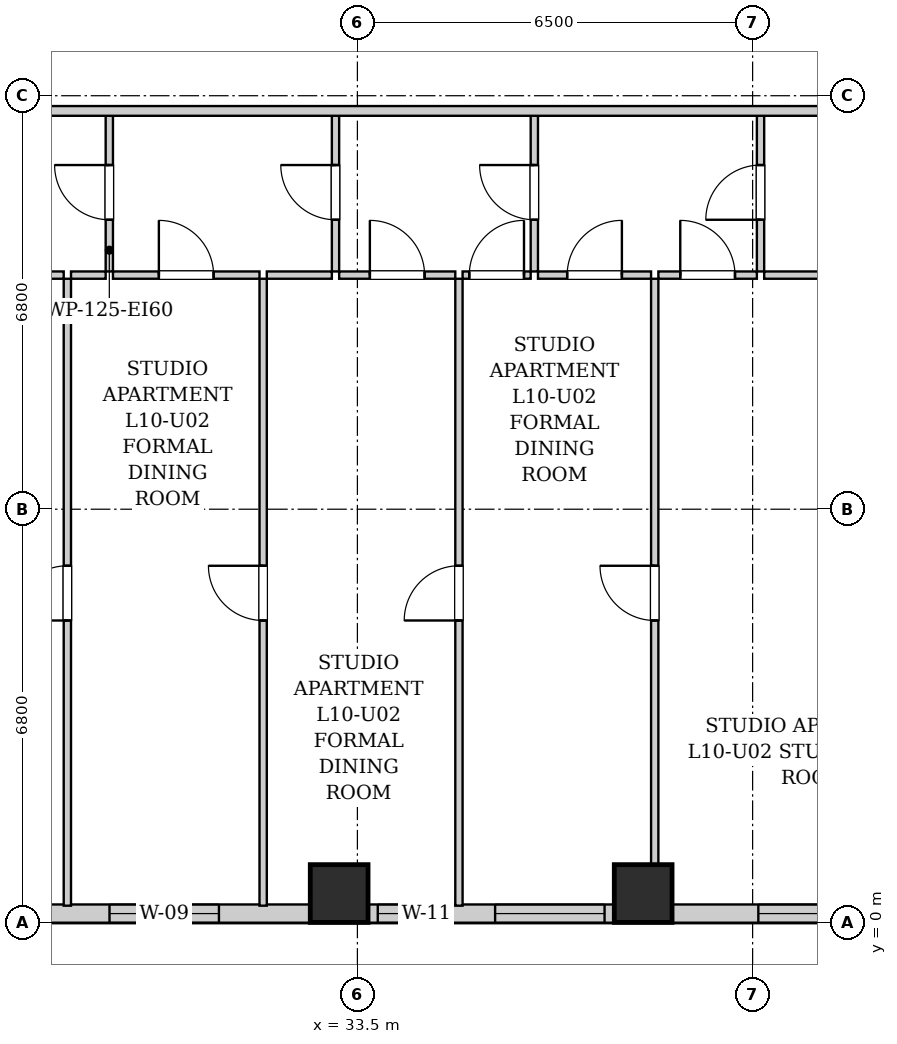
"""IFC4 building model, lengths in metres.
Left out: names, types, materials, properties, quantities, classifications, styles, units other than length and angle.
Written with IfcOpenShell. Run it as: python <this file> out.ifc"""

import sys

from ifc_helpers import new_model, si_unit, direction, frame, frame_2d, origin, origin_2d, place, context, subcontext, project, spatial, rectangle, extrude, element, fill, save


model = new_model("IFC4")
c1 = context("Model", 3, precision=1e-05, world=origin(), true_north=direction((0.0, 1.0)))
c2 = subcontext(c1, "Body", "Model", "MODEL_VIEW")
j1 = project(units=[si_unit("LENGTHUNIT", "METRE"), si_unit("PLANEANGLEUNIT", "RADIAN")], contexts=[c1])
p1 = place(None, origin())
s1 = spatial("IfcSite", under=j1, at=p1, CompositionType="ELEMENT")
p2 = place(p1, origin())
s2 = spatial("IfcBuilding", under=s1, at=p2, CompositionType="ELEMENT")
p3 = place(p2, frame((0.0, 0.0, 41.8)))
s3 = spatial("IfcBuildingStorey", under=s2, at=p3, CompositionType="ELEMENT", Elevation=41.8)
for number, where, z_axis, x_axis in (
    (1, (33.2, 0.48, 0.0), (0.0, 0.0, 1.0), (1.0, 0.0, 0.0)),
    (2, (38.2, 0.48, 0.0), (0.0, 0.0, 1.0), (1.0, 0.0, 0.0)),
):
    element("IfcColumn", number, at=place(p3, frame(where, z_axis=z_axis, x_axis=x_axis)), inside=s3, PredefinedType="COLUMN", context=c2, shape_type="SweptSolid", body=[
        extrude(rectangle(XDim=0.95, YDim=0.95, at=origin_2d()), origin(), (0.0, 0.0, 1.0), 3.2),
    ])
p4 = place(p3, frame((44.0, 0.15, 0.0), z_axis=(0.0, 0.0, 1.0), x_axis=(-1.0, 0.0, 0.0)))
e3 = element("IfcWall", 3, at=p4, inside=s3, PredefinedType="SOLIDWALL", context=c2, shape_type="SweptSolid", body=[
    extrude(rectangle(XDim=25.7, YDim=0.3, at=frame_2d((12.85, 0.0))), origin(), (0.0, 0.0, 1.0), 1.975),
])
p5 = place(p4, frame((22.471, 0.0, 0.55)))
e4 = element("IfcOpeningElement", 4, at=p5, cuts=e3, PredefinedType="OPENING", context=c2, shape_type="SweptSolid", body=[
    extrude(rectangle(XDim=1.8, YDim=1.2, at=frame_2d((0.9, 0.6))), frame((0.0, 0.16, 0.0), z_axis=(0.0, -1.0, 0.0), x_axis=(1.0, 0.0, 0.0)), (0.0, 0.0, 1.0), 0.32),
])
p6 = place(p4, frame((15.65, 0.0, 0.55)))
e5 = element("IfcOpeningElement", 5, at=p6, cuts=e3, PredefinedType="OPENING", context=c2, shape_type="SweptSolid", body=[
    extrude(rectangle(XDim=0.85, YDim=1.2, at=frame_2d((0.425, 0.6))), frame((0.0, 0.16, 0.0), z_axis=(0.0, -1.0, 0.0), x_axis=(1.0, 0.0, 0.0)), (0.0, 0.0, 1.0), 0.32),
])
p7 = place(p4, frame((12.777, 0.0, 0.55)))
e6 = element("IfcOpeningElement", 6, at=p7, cuts=e3, PredefinedType="OPENING", context=c2, shape_type="SweptSolid", body=[
    extrude(rectangle(XDim=1.8, YDim=1.2, at=frame_2d((0.9, 0.6))), frame((0.0, 0.16, 0.0), z_axis=(0.0, -1.0, 0.0), x_axis=(1.0, 0.0, 0.0)), (0.0, 0.0, 1.0), 0.32),
])
p8 = place(p4, frame((9.315, 0.0, 0.55)))
e7 = element("IfcOpeningElement", 7, at=p8, cuts=e3, PredefinedType="OPENING", context=c2, shape_type="SweptSolid", body=[
    extrude(rectangle(XDim=0.85, YDim=1.2, at=frame_2d((0.425, 0.6))), frame((0.0, 0.16, 0.0), z_axis=(0.0, -1.0, 0.0), x_axis=(1.0, 0.0, 0.0)), (0.0, 0.0, 1.0), 0.32),
])
p9 = place(p4, frame((6.435, 0.0, 0.55)))
e8 = element("IfcOpeningElement", 8, at=p9, cuts=e3, PredefinedType="OPENING", context=c2, shape_type="SweptSolid", body=[
    extrude(rectangle(XDim=1.8, YDim=1.2, at=frame_2d((0.9, 0.6))), frame((0.0, 0.16, 0.0), z_axis=(0.0, -1.0, 0.0), x_axis=(1.0, 0.0, 0.0)), (0.0, 0.0, 1.0), 0.32),
])
p10 = place(p4, frame((2.106, 0.0, 0.55)))
e9 = element("IfcOpeningElement", 9, at=p10, cuts=e3, PredefinedType="OPENING", context=c2, shape_type="SweptSolid", body=[
    extrude(rectangle(XDim=1.8, YDim=1.2, at=frame_2d((0.9, 0.6))), frame((0.0, 0.16, 0.0), z_axis=(0.0, -1.0, 0.0), x_axis=(1.0, 0.0, 0.0)), (0.0, 0.0, 1.0), 0.32),
])
p11 = place(p3, frame((29.42, 10.71, 0.0), z_axis=(0.0, 0.0, 1.0), x_axis=(0.0, 1.0, 0.0)))
e10 = element("IfcWall", 10, at=p11, inside=s3, PredefinedType="PARTITIONING", context=c2, shape_type="SweptSolid", body=[
    extrude(rectangle(XDim=2.6, YDim=0.12, at=frame_2d((1.3, 0.0))), origin(), (0.0, 0.0, 1.0), 2.94),
])
p12 = place(p11, frame((0.85, 0.0, 0.0)))
e11 = element("IfcOpeningElement", 11, at=p12, cuts=e10, PredefinedType="OPENING", context=c2, shape_type="SweptSolid", body=[
    extrude(rectangle(XDim=0.9, YDim=2.05, at=frame_2d((0.45, 1.025))), frame((0.0, 0.07, 0.0), z_axis=(0.0, -1.0, 0.0), x_axis=(1.0, 0.0, 0.0)), (0.0, 0.0, 1.0), 0.14),
])
p13 = place(p3, frame((26.21, 10.65, 0.0), z_axis=(0.0, 0.0, 1.0), x_axis=(1.0, 0.0, 0.0)))
e12 = element("IfcWall", 12, at=p13, inside=s3, PredefinedType="PARTITIONING", context=c2, shape_type="SweptSolid", body=[
    extrude(rectangle(XDim=2.46, YDim=0.12, at=frame_2d((1.23, 0.0))), origin(), (0.0, 0.0, 1.0), 2.94),
])
p14 = place(p13, frame((0.78, 0.0, 0.0)))
e13 = element("IfcOpeningElement", 13, at=p14, cuts=e12, PredefinedType="OPENING", context=c2, shape_type="SweptSolid", body=[
    extrude(rectangle(XDim=0.9, YDim=2.05, at=frame_2d((0.45, 1.025))), frame((0.0, 0.07, 0.0), z_axis=(0.0, -1.0, 0.0), x_axis=(1.0, 0.0, 0.0)), (0.0, 0.0, 1.0), 0.14),
])
p15 = place(p3, frame((28.79, 10.65, 0.0), z_axis=(0.0, 0.0, 1.0), x_axis=(1.0, 0.0, 0.0)))
e14 = element("IfcWall", 14, at=p15, inside=s3, PredefinedType="PARTITIONING", context=c2, shape_type="SweptSolid", body=[
    extrude(rectangle(XDim=0.57, YDim=0.12, at=frame_2d((0.285, 0.0))), origin(), (0.0, 0.0, 1.0), 2.94),
])
p16 = place(p3, frame((33.14, 10.71, 0.0), z_axis=(0.0, 0.0, 1.0), x_axis=(0.0, 1.0, 0.0)))
e15 = element("IfcWall", 15, at=p16, inside=s3, PredefinedType="PARTITIONING", context=c2, shape_type="SweptSolid", body=[
    extrude(rectangle(XDim=2.6, YDim=0.12, at=frame_2d((1.3, 0.0))), origin(), (0.0, 0.0, 1.0), 2.155),
])
p17 = place(p16, frame((0.85, 0.0, 0.0)))
e16 = element("IfcOpeningElement", 16, at=p17, cuts=e15, PredefinedType="OPENING", context=c2, shape_type="SweptSolid", body=[
    extrude(rectangle(XDim=0.9, YDim=2.05, at=frame_2d((0.45, 1.025))), frame((0.0, 0.07, 0.0), z_axis=(0.0, -1.0, 0.0), x_axis=(1.0, 0.0, 0.0)), (0.0, 0.0, 1.0), 0.14),
])
p18 = place(p3, frame((29.48, 10.65, 0.0), z_axis=(0.0, 0.0, 1.0), x_axis=(1.0, 0.0, 0.0)))
e17 = element("IfcWall", 17, at=p18, inside=s3, PredefinedType="PARTITIONING", context=c2, shape_type="SweptSolid", body=[
    extrude(rectangle(XDim=2.41, YDim=0.12, at=frame_2d((1.205, 0.0))), origin(), (0.0, 0.0, 1.0), 2.94),
])
p19 = place(p18, frame((0.755, 0.0, 0.0)))
e18 = element("IfcOpeningElement", 18, at=p19, cuts=e17, PredefinedType="OPENING", context=c2, shape_type="SweptSolid", body=[
    extrude(rectangle(XDim=0.9, YDim=2.05, at=frame_2d((0.45, 1.025))), frame((0.0, 0.07, 0.0), z_axis=(0.0, -1.0, 0.0), x_axis=(1.0, 0.0, 0.0)), (0.0, 0.0, 1.0), 0.14),
])
p20 = place(p3, frame((32.01, 10.65, 0.0), z_axis=(0.0, 0.0, 1.0), x_axis=(1.0, 0.0, 0.0)))
e19 = element("IfcWall", 19, at=p20, inside=s3, PredefinedType="PARTITIONING", context=c2, shape_type="SweptSolid", body=[
    extrude(rectangle(XDim=1.07, YDim=0.12, at=frame_2d((0.535, 0.0))), origin(), (0.0, 0.0, 1.0), 2.94),
])
p21 = place(p3, frame((36.41, 10.71, 0.0), z_axis=(0.0, 0.0, 1.0), x_axis=(0.0, 1.0, 0.0)))
e20 = element("IfcWall", 20, at=p21, inside=s3, PredefinedType="PARTITIONING", context=c2, shape_type="SweptSolid", body=[
    extrude(rectangle(XDim=2.6, YDim=0.12, at=frame_2d((1.3, 0.0))), origin(), (0.0, 0.0, 1.0), 2.94),
])
p22 = place(p21, frame((0.85, 0.0, 0.0)))
e21 = element("IfcOpeningElement", 21, at=p22, cuts=e20, PredefinedType="OPENING", context=c2, shape_type="SweptSolid", body=[
    extrude(rectangle(XDim=0.9, YDim=2.05, at=frame_2d((0.45, 1.025))), frame((0.0, 0.07, 0.0), z_axis=(0.0, -1.0, 0.0), x_axis=(1.0, 0.0, 0.0)), (0.0, 0.0, 1.0), 0.14),
])
p23 = place(p3, frame((33.2, 10.65, 0.0), z_axis=(0.0, 0.0, 1.0), x_axis=(1.0, 0.0, 0.0)))
e22 = element("IfcWall", 22, at=p23, inside=s3, PredefinedType="PARTITIONING", context=c2, shape_type="SweptSolid", body=[
    extrude(rectangle(XDim=1.91, YDim=0.12, at=frame_2d((0.955, 0.0))), origin(), (0.0, 0.0, 1.0), 2.94),
])
p24 = place(p23, frame((0.505, 0.0, 0.0)))
e23 = element("IfcOpeningElement", 23, at=p24, cuts=e22, PredefinedType="OPENING", context=c2, shape_type="SweptSolid", body=[
    extrude(rectangle(XDim=0.9, YDim=2.05, at=frame_2d((0.45, 1.025))), frame((0.0, 0.07, 0.0), z_axis=(0.0, -1.0, 0.0), x_axis=(1.0, 0.0, 0.0)), (0.0, 0.0, 1.0), 0.14),
])
p25 = place(p3, frame((35.23, 10.65, 0.0), z_axis=(0.0, 0.0, 1.0), x_axis=(1.0, 0.0, 0.0)))
e24 = element("IfcWall", 24, at=p25, inside=s3, PredefinedType="PARTITIONING", context=c2, shape_type="SweptSolid", body=[
    extrude(rectangle(XDim=1.12, YDim=0.12, at=frame_2d((0.56, 0.0))), origin(), (0.0, 0.0, 1.0), 2.94),
])
p26 = place(p25, frame((0.11, 0.0, 0.0)))
e25 = element("IfcOpeningElement", 25, at=p26, cuts=e24, PredefinedType="OPENING", context=c2, shape_type="SweptSolid", body=[
    extrude(rectangle(XDim=0.9, YDim=2.05, at=frame_2d((0.45, 1.025))), frame((0.0, 0.07, 0.0), z_axis=(0.0, -1.0, 0.0), x_axis=(1.0, 0.0, 0.0)), (0.0, 0.0, 1.0), 0.14),
])
p27 = place(p3, frame((40.13, 10.71, 0.0), z_axis=(0.0, 0.0, 1.0), x_axis=(0.0, 1.0, 0.0)))
e26 = element("IfcWall", 26, at=p27, inside=s3, PredefinedType="PARTITIONING", context=c2, shape_type="SweptSolid", body=[
    extrude(rectangle(XDim=2.6, YDim=0.12, at=frame_2d((1.3, 0.0))), origin(), (0.0, 0.0, 1.0), 2.94),
])
p28 = place(p27, frame((0.85, 0.0, 0.0)))
e27 = element("IfcOpeningElement", 27, at=p28, cuts=e26, PredefinedType="OPENING", context=c2, shape_type="SweptSolid", body=[
    extrude(rectangle(XDim=0.9, YDim=2.05, at=frame_2d((0.45, 1.025))), frame((0.0, 0.07, 0.0), z_axis=(0.0, -1.0, 0.0), x_axis=(1.0, 0.0, 0.0)), (0.0, 0.0, 1.0), 0.14),
])
p29 = place(p3, frame((36.47, 10.65, 0.0), z_axis=(0.0, 0.0, 1.0), x_axis=(1.0, 0.0, 0.0)))
e28 = element("IfcWall", 28, at=p29, inside=s3, PredefinedType="PARTITIONING", context=c2, shape_type="SweptSolid", body=[
    extrude(rectangle(XDim=1.86, YDim=0.12, at=frame_2d((0.93, 0.0))), origin(), (0.0, 0.0, 1.0), 2.94),
])
p30 = place(p29, frame((0.48, 0.0, 0.0)))
e29 = element("IfcOpeningElement", 29, at=p30, cuts=e28, PredefinedType="OPENING", context=c2, shape_type="SweptSolid", body=[
    extrude(rectangle(XDim=0.9, YDim=2.05, at=frame_2d((0.45, 1.025))), frame((0.0, 0.07, 0.0), z_axis=(0.0, -1.0, 0.0), x_axis=(1.0, 0.0, 0.0)), (0.0, 0.0, 1.0), 0.14),
])
p31 = place(p3, frame((38.45, 10.65, 0.0), z_axis=(0.0, 0.0, 1.0), x_axis=(1.0, 0.0, 0.0)))
e30 = element("IfcWall", 30, at=p31, inside=s3, PredefinedType="PARTITIONING", context=c2, shape_type="SweptSolid", body=[
    extrude(rectangle(XDim=1.62, YDim=0.12, at=frame_2d((0.81, 0.0))), origin(), (0.0, 0.0, 1.0), 2.94),
])
p32 = place(p31, frame((0.36, 0.0, 0.0)))
e31 = element("IfcOpeningElement", 31, at=p32, cuts=e30, PredefinedType="OPENING", context=c2, shape_type="SweptSolid", body=[
    extrude(rectangle(XDim=0.9, YDim=2.05, at=frame_2d((0.45, 1.025))), frame((0.0, 0.07, 0.0), z_axis=(0.0, -1.0, 0.0), x_axis=(1.0, 0.0, 0.0)), (0.0, 0.0, 1.0), 0.14),
])
p33 = place(p3, frame((40.19, 10.65, 0.0), z_axis=(0.0, 0.0, 1.0), x_axis=(1.0, 0.0, 0.0)))
e32 = element("IfcWall", 32, at=p33, inside=s3, PredefinedType="PARTITIONING", context=c2, shape_type="SweptSolid", body=[
    extrude(rectangle(XDim=3.3, YDim=0.12, at=frame_2d((1.65, 0.0))), origin(), (0.0, 0.0, 1.0), 2.94),
])
p34 = place(p33, frame((1.2, 0.0, 0.0)))
e33 = element("IfcOpeningElement", 33, at=p34, cuts=e32, PredefinedType="OPENING", context=c2, shape_type="SweptSolid", body=[
    extrude(rectangle(XDim=0.9, YDim=2.05, at=frame_2d((0.45, 1.025))), frame((0.0, 0.07, 0.0), z_axis=(0.0, -1.0, 0.0), x_axis=(1.0, 0.0, 0.0)), (0.0, 0.0, 1.0), 0.14),
])
p35 = place(p3, frame((28.73, 0.28, 0.0), z_axis=(0.0, 0.0, 1.0), x_axis=(0.0, 1.0, 0.0)))
e34 = element("IfcWall", 34, at=p35, inside=s3, PredefinedType="PARTITIONING", context=c2, shape_type="SweptSolid", body=[
    extrude(rectangle(XDim=10.31, YDim=0.12, at=frame_2d((5.155, 0.0))), origin(), (0.0, 0.0, 1.0), 2.94),
])
p36 = place(p35, frame((4.69, 0.0, 0.0)))
e35 = element("IfcOpeningElement", 35, at=p36, cuts=e34, PredefinedType="OPENING", context=c2, shape_type="SweptSolid", body=[
    extrude(rectangle(XDim=0.9, YDim=2.05, at=frame_2d((0.45, 1.025))), frame((0.0, 0.07, 0.0), z_axis=(0.0, -1.0, 0.0), x_axis=(1.0, 0.0, 0.0)), (0.0, 0.0, 1.0), 0.14),
])
p37 = place(p3, frame((31.95, 0.28, 0.0), z_axis=(0.0, 0.0, 1.0), x_axis=(0.0, 1.0, 0.0)))
e36 = element("IfcWall", 36, at=p37, inside=s3, PredefinedType="PARTITIONING", context=c2, shape_type="SweptSolid", body=[
    extrude(rectangle(XDim=10.31, YDim=0.12, at=frame_2d((5.155, 0.0))), origin(), (0.0, 0.0, 1.0), 2.94),
])
p38 = place(p37, frame((4.69, 0.0, 0.0)))
e37 = element("IfcOpeningElement", 37, at=p38, cuts=e36, PredefinedType="OPENING", context=c2, shape_type="SweptSolid", body=[
    extrude(rectangle(XDim=0.9, YDim=2.05, at=frame_2d((0.45, 1.025))), frame((0.0, 0.07, 0.0), z_axis=(0.0, -1.0, 0.0), x_axis=(1.0, 0.0, 0.0)), (0.0, 0.0, 1.0), 0.14),
])
p39 = place(p3, frame((35.17, 0.28, 0.0), z_axis=(0.0, 0.0, 1.0), x_axis=(0.0, 1.0, 0.0)))
e38 = element("IfcWall", 38, at=p39, inside=s3, PredefinedType="PARTITIONING", context=c2, shape_type="SweptSolid", body=[
    extrude(rectangle(XDim=10.31, YDim=0.12, at=frame_2d((5.155, 0.0))), origin(), (0.0, 0.0, 1.0), 2.94),
])
p40 = place(p39, frame((4.69, 0.0, 0.0)))
e39 = element("IfcOpeningElement", 39, at=p40, cuts=e38, PredefinedType="OPENING", context=c2, shape_type="SweptSolid", body=[
    extrude(rectangle(XDim=0.9, YDim=2.05, at=frame_2d((0.45, 1.025))), frame((0.0, 0.07, 0.0), z_axis=(0.0, -1.0, 0.0), x_axis=(1.0, 0.0, 0.0)), (0.0, 0.0, 1.0), 0.14),
])
p41 = place(p3, frame((38.39, 0.28, 0.0), z_axis=(0.0, 0.0, 1.0), x_axis=(0.0, 1.0, 0.0)))
e40 = element("IfcWall", 40, at=p41, inside=s3, PredefinedType="PARTITIONING", context=c2, shape_type="SweptSolid", body=[
    extrude(rectangle(XDim=10.31, YDim=0.12, at=frame_2d((5.155, 0.0))), origin(), (0.0, 0.0, 1.0), 2.94),
])
p42 = place(p41, frame((4.69, 0.0, 0.0)))
e41 = element("IfcOpeningElement", 41, at=p42, cuts=e40, PredefinedType="OPENING", context=c2, shape_type="SweptSolid", body=[
    extrude(rectangle(XDim=0.9, YDim=2.05, at=frame_2d((0.45, 1.025))), frame((0.0, 0.07, 0.0), z_axis=(0.0, -1.0, 0.0), x_axis=(1.0, 0.0, 0.0)), (0.0, 0.0, 1.0), 0.14),
])
p43 = place(p3, frame((10.05, 13.35, 0.0), z_axis=(0.0, 0.0, 1.0), x_axis=(1.0, 0.0, 0.0)))
e42 = element("IfcWall", 42, at=p43, inside=s3, PredefinedType="PARTITIONING", context=c2, shape_type="SweptSolid", body=[
    extrude(rectangle(XDim=33.9, YDim=0.16, at=frame_2d((16.95, 0.0))), origin(), (0.0, 0.0, 1.0), 2.94),
])
p44 = place(p43, frame((3.8, 0.0, 0.0)))
e43 = element("IfcOpeningElement", 43, at=p44, cuts=e42, PredefinedType="OPENING", context=c2, shape_type="SweptSolid", body=[
    extrude(rectangle(XDim=0.95, YDim=2.1, at=frame_2d((0.475, 1.05))), frame((0.0, 0.09, 0.0), z_axis=(0.0, -1.0, 0.0), x_axis=(1.0, 0.0, 0.0)), (0.0, 0.0, 1.0), 0.18),
])
p45 = place(p43, frame((13.345, 0.0, 0.0)))
e44 = element("IfcOpeningElement", 44, at=p45, cuts=e42, PredefinedType="OPENING", context=c2, shape_type="SweptSolid", body=[
    extrude(rectangle(XDim=0.95, YDim=2.1, at=frame_2d((0.475, 1.05))), frame((0.0, 0.09, 0.0), z_axis=(0.0, -1.0, 0.0), x_axis=(1.0, 0.0, 0.0)), (0.0, 0.0, 1.0), 0.18),
])
p46 = place(p12, origin())
e45 = element("IfcDoor", 45, at=p46, inside=s3, OperationType="SINGLE_SWING_RIGHT", PredefinedType="DOOR", context=c2, shape_type="SweptSolid", body=[
    extrude(rectangle(XDim=0.9, YDim=2.05, at=frame_2d((0.45, 1.025))), frame((0.0, 0.025, 0.0), z_axis=(0.0, -1.0, 0.0), x_axis=(1.0, 0.0, 0.0)), (0.0, 0.0, 1.0), 0.05),
])
fill(e11, e45)
p47 = place(p17, origin())
e46 = element("IfcDoor", 46, at=p47, inside=s3, OperationType="SINGLE_SWING_RIGHT", PredefinedType="DOOR", context=c2, shape_type="SweptSolid", body=[
    extrude(rectangle(XDim=0.9, YDim=2.05, at=frame_2d((0.45, 1.025))), frame((0.0, 0.025, 0.0), z_axis=(0.0, -1.0, 0.0), x_axis=(1.0, 0.0, 0.0)), (0.0, 0.0, 1.0), 0.05),
])
fill(e16, e46)
p48 = place(p19, origin())
e47 = element("IfcDoor", 47, at=p48, inside=s3, OperationType="SINGLE_SWING_LEFT", PredefinedType="DOOR", context=c2, shape_type="SweptSolid", body=[
    extrude(rectangle(XDim=0.9, YDim=2.05, at=frame_2d((0.45, 1.025))), frame((0.0, 0.025, 0.0), z_axis=(0.0, -1.0, 0.0), x_axis=(1.0, 0.0, 0.0)), (0.0, 0.0, 1.0), 0.05),
])
fill(e18, e47)
p49 = place(p22, origin())
e48 = element("IfcDoor", 48, at=p49, inside=s3, OperationType="SINGLE_SWING_RIGHT", PredefinedType="DOOR", context=c2, shape_type="SweptSolid", body=[
    extrude(rectangle(XDim=0.9, YDim=2.05, at=frame_2d((0.45, 1.025))), frame((0.0, 0.025, 0.0), z_axis=(0.0, -1.0, 0.0), x_axis=(1.0, 0.0, 0.0)), (0.0, 0.0, 1.0), 0.05),
])
fill(e21, e48)
p50 = place(p24, origin())
e49 = element("IfcDoor", 49, at=p50, inside=s3, OperationType="SINGLE_SWING_LEFT", PredefinedType="DOOR", context=c2, shape_type="SweptSolid", body=[
    extrude(rectangle(XDim=0.9, YDim=2.05, at=frame_2d((0.45, 1.025))), frame((0.0, 0.025, 0.0), z_axis=(0.0, -1.0, 0.0), x_axis=(1.0, 0.0, 0.0)), (0.0, 0.0, 1.0), 0.05),
])
fill(e23, e49)
p51 = place(p26, origin())
e50 = element("IfcDoor", 50, at=p51, inside=s3, OperationType="SINGLE_SWING_RIGHT", PredefinedType="DOOR", context=c2, shape_type="SweptSolid", body=[
    extrude(rectangle(XDim=0.9, YDim=2.05, at=frame_2d((0.45, 1.025))), frame((0.0, 0.025, 0.0), z_axis=(0.0, -1.0, 0.0), x_axis=(1.0, 0.0, 0.0)), (0.0, 0.0, 1.0), 0.05),
])
fill(e25, e50)
p52 = place(p28, origin())
e51 = element("IfcDoor", 51, at=p52, inside=s3, OperationType="SINGLE_SWING_LEFT", PredefinedType="DOOR", context=c2, shape_type="SweptSolid", body=[
    extrude(rectangle(XDim=0.9, YDim=2.05, at=frame_2d((0.45, 1.025))), frame((0.0, 0.025, 0.0), z_axis=(0.0, -1.0, 0.0), x_axis=(1.0, 0.0, 0.0)), (0.0, 0.0, 1.0), 0.05),
])
fill(e27, e51)
p53 = place(p30, origin())
e52 = element("IfcDoor", 52, at=p53, inside=s3, OperationType="SINGLE_SWING_RIGHT", PredefinedType="DOOR", context=c2, shape_type="SweptSolid", body=[
    extrude(rectangle(XDim=0.9, YDim=2.05, at=frame_2d((0.45, 1.025))), frame((0.0, 0.025, 0.0), z_axis=(0.0, -1.0, 0.0), x_axis=(1.0, 0.0, 0.0)), (0.0, 0.0, 1.0), 0.05),
])
fill(e29, e52)
p54 = place(p32, origin())
e53 = element("IfcDoor", 53, at=p54, inside=s3, OperationType="SINGLE_SWING_LEFT", PredefinedType="DOOR", context=c2, shape_type="SweptSolid", body=[
    extrude(rectangle(XDim=0.9, YDim=2.05, at=frame_2d((0.45, 1.025))), frame((0.0, 0.025, 0.0), z_axis=(0.0, -1.0, 0.0), x_axis=(1.0, 0.0, 0.0)), (0.0, 0.0, 1.0), 0.05),
])
fill(e31, e53)
p55 = place(p36, origin())
e54 = element("IfcDoor", 54, at=p55, inside=s3, OperationType="SINGLE_SWING_LEFT", PredefinedType="DOOR", context=c2, shape_type="SweptSolid", body=[
    extrude(rectangle(XDim=0.9, YDim=2.05, at=frame_2d((0.45, 1.025))), frame((0.0, 0.025, 0.0), z_axis=(0.0, -1.0, 0.0), x_axis=(1.0, 0.0, 0.0)), (0.0, 0.0, 1.0), 0.05),
])
fill(e35, e54)
p56 = place(p38, origin())
e55 = element("IfcDoor", 55, at=p56, inside=s3, OperationType="SINGLE_SWING_RIGHT", PredefinedType="DOOR", context=c2, shape_type="SweptSolid", body=[
    extrude(rectangle(XDim=0.9, YDim=2.05, at=frame_2d((0.45, 1.025))), frame((0.0, 0.025, 0.0), z_axis=(0.0, -1.0, 0.0), x_axis=(1.0, 0.0, 0.0)), (0.0, 0.0, 1.0), 0.05),
])
fill(e37, e55)
p57 = place(p40, origin())
e56 = element("IfcDoor", 56, at=p57, inside=s3, OperationType="SINGLE_SWING_LEFT", PredefinedType="DOOR", context=c2, shape_type="SweptSolid", body=[
    extrude(rectangle(XDim=0.9, YDim=2.05, at=frame_2d((0.45, 1.025))), frame((0.0, 0.025, 0.0), z_axis=(0.0, -1.0, 0.0), x_axis=(1.0, 0.0, 0.0)), (0.0, 0.0, 1.0), 0.05),
])
fill(e39, e56)
p58 = place(p42, origin())
e57 = element("IfcDoor", 57, at=p58, inside=s3, OperationType="SINGLE_SWING_RIGHT", PredefinedType="DOOR", context=c2, shape_type="SweptSolid", body=[
    extrude(rectangle(XDim=0.9, YDim=2.05, at=frame_2d((0.45, 1.025))), frame((0.0, 0.025, 0.0), z_axis=(0.0, -1.0, 0.0), x_axis=(1.0, 0.0, 0.0)), (0.0, 0.0, 1.0), 0.05),
])
fill(e41, e57)
p59 = place(p7, origin())
e58 = element("IfcWindow", 58, at=p59, inside=s3, PartitioningType="DOUBLE_PANEL_VERTICAL", PredefinedType="WINDOW", context=c2, shape_type="SweptSolid", body=[
    extrude(rectangle(XDim=1.8, YDim=1.2, at=frame_2d((0.9, 0.6))), frame((0.0, 0.03, 0.0), z_axis=(0.0, -1.0, 0.0), x_axis=(1.0, 0.0, 0.0)), (0.0, 0.0, 1.0), 0.06),
])
fill(e6, e58)
p60 = place(p8, origin())
e59 = element("IfcWindow", 59, at=p60, inside=s3, PartitioningType="SINGLE_PANEL", PredefinedType="WINDOW", context=c2, shape_type="SweptSolid", body=[
    extrude(rectangle(XDim=0.85, YDim=1.2, at=frame_2d((0.425, 0.6))), frame((0.0, 0.03, 0.0), z_axis=(0.0, -1.0, 0.0), x_axis=(1.0, 0.0, 0.0)), (0.0, 0.0, 1.0), 0.06),
])
fill(e7, e59)
p61 = place(p9, origin())
e60 = element("IfcWindow", 60, at=p61, inside=s3, PartitioningType="DOUBLE_PANEL_VERTICAL", PredefinedType="WINDOW", context=c2, shape_type="SweptSolid", body=[
    extrude(rectangle(XDim=1.8, YDim=1.2, at=frame_2d((0.9, 0.6))), frame((0.0, 0.03, 0.0), z_axis=(0.0, -1.0, 0.0), x_axis=(1.0, 0.0, 0.0)), (0.0, 0.0, 1.0), 0.06),
])
fill(e8, e60)
p62 = place(p10, origin())
e61 = element("IfcWindow", 61, at=p62, inside=s3, PartitioningType="DOUBLE_PANEL_VERTICAL", PredefinedType="WINDOW", context=c2, shape_type="SweptSolid", body=[
    extrude(rectangle(XDim=1.8, YDim=1.2, at=frame_2d((0.9, 0.6))), frame((0.0, 0.03, 0.0), z_axis=(0.0, -1.0, 0.0), x_axis=(1.0, 0.0, 0.0)), (0.0, 0.0, 1.0), 0.06),
])
fill(e9, e61)
save(model, sys.argv[1])
